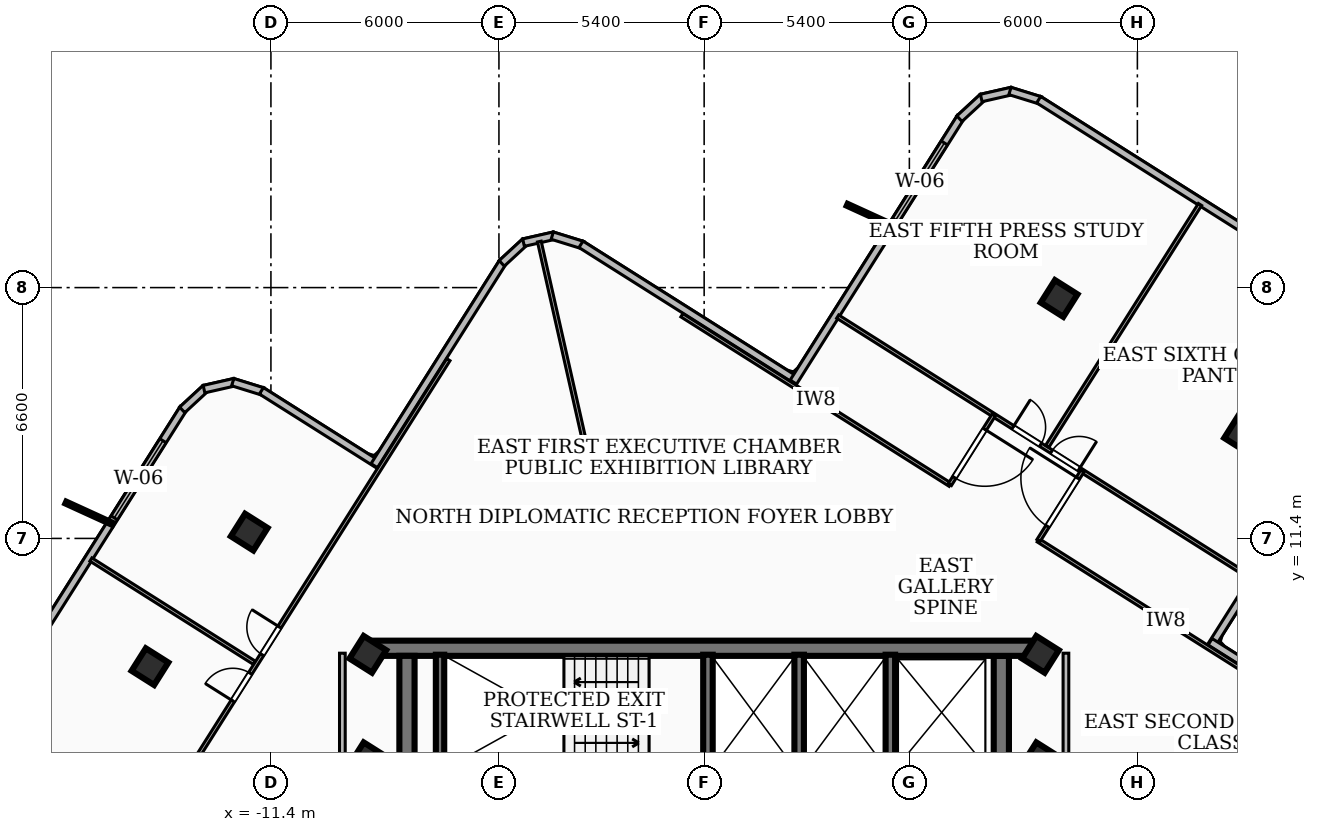
"""IFC4 building model, lengths in metres.
Left out: names, types, materials, properties, quantities, classifications, styles, units other than length and angle.
Written with IfcOpenShell. Run it as: python <this file> out.ifc"""

import sys

from ifc_helpers import new_model, si_unit, direction, frame, frame_2d, origin, origin_2d, place, context, subcontext, project, spatial, rectangle, extrude, element, fill, save


model = new_model("IFC4")
c1 = context("Model", 3, precision=1e-05, world=origin(), true_north=direction((0.0, 1.0)))
c2 = subcontext(c1, "Body", "Model", "MODEL_VIEW")
j1 = project(units=[si_unit("LENGTHUNIT", "METRE"), si_unit("PLANEANGLEUNIT", "RADIAN")], contexts=[c1])
p1 = place(None, origin())
s1 = spatial("IfcSite", under=j1, at=p1, CompositionType="ELEMENT")
p2 = place(p1, origin())
s2 = spatial("IfcBuilding", under=s1, at=p2, CompositionType="ELEMENT")
p3 = place(p2, frame((0.0, 0.0, 271.44)))
s3 = spatial("IfcBuildingStorey", under=s2, at=p3, CompositionType="ELEMENT", Elevation=271.44)
p4 = place(p3, frame((-8.78, 8.51, 0.0), z_axis=(0.0, 0.0, 1.0), x_axis=(1.0, 0.0, 0.0)))
e1 = element("IfcWall", 1, at=p4, inside=s3, PredefinedType="SHEAR", context=c2, shape_type="SweptSolid", body=[
    extrude(rectangle(XDim=17.56, YDim=0.4, at=frame_2d((8.78, 0.0))), origin(), (0.0, 0.0, 1.0), 3.16),
])
for number, where, z_axis, x_axis in (
    (2, (-7.82, 1.95, 0.0), (0.0, 0.0, 1.0), (0.0, 1.0, 0.0)),
    (3, (7.82, 8.31, 0.0), (0.0, 0.0, 1.0), (0.0, -1.0, 0.0)),
):
    element("IfcWall", number, at=place(p3, frame(where, z_axis=z_axis, x_axis=x_axis)), inside=s3, PredefinedType="SHEAR", context=c2, shape_type="SweptSolid", body=[
        extrude(rectangle(XDim=6.36, YDim=0.4, at=frame_2d((3.18, 0.0))), origin(), (0.0, 0.0, 1.0), 3.16),
    ])
p5 = place(p3, frame((-6.95, 5.28, 0.0), z_axis=(0.0, 0.0, 1.0), x_axis=(0.0, 1.0, 0.0)))
e4 = element("IfcWall", 4, at=p5, inside=s3, PredefinedType="SOLIDWALL", context=c2, shape_type="SweptSolid", body=[
    extrude(rectangle(XDim=3.06, YDim=0.22, at=frame_2d((1.53, 0.0))), origin(), (0.0, 0.0, 1.0), 3.16),
])
for number, where, z_axis, x_axis in (
    (5, (0.1, 5.3, 0.0), (0.0, 0.0, 1.0), (0.0, 1.0, 0.0)),
    (6, (2.5, 5.3, 0.0), (0.0, 0.0, 1.0), (0.0, 1.0, 0.0)),
    (7, (4.9, 5.3, 0.0), (0.0, 0.0, 1.0), (0.0, 1.0, 0.0)),
):
    element("IfcWall", number, at=place(p3, frame(where, z_axis=z_axis, x_axis=x_axis)), inside=s3, PredefinedType="SOLIDWALL", context=c2, shape_type="SweptSolid", body=[
        extrude(rectangle(XDim=3.04, YDim=0.25, at=frame_2d((1.52, 0.0))), origin(), (0.0, 0.0, 1.0), 3.16),
    ])
for number, where, z_axis, x_axis in (
    (8, (-8.85, 5.55, 0.0), (0.0, 0.0, 1.0), (0.534, 0.845, 0.0)),
    (9, (8.85, 5.55, 0.0), (0.0, 0.0, 1.0), (0.534, 0.845, 0.0)),
    (10, (-8.85, 8.35, 0.0), (0.0, 0.0, 1.0), (0.534, 0.845, 0.0)),
    (11, (8.85, 8.35, 0.0), (0.0, 0.0, 1.0), (0.534, 0.845, 0.0)),
    (12, (14.169, 14.152, 0.0), (0.0, 0.0, 1.0), (0.534, 0.845, 0.0)),
    (13, (9.341, 17.714, 0.0), (0.0, 0.0, 1.0), (0.534, 0.845, 0.0)),
    (14, (-11.971, 11.566, 0.0), (0.0, 0.0, 1.0), (0.534, 0.845, 0.0)),
    (15, (-14.583, 8.026, 0.0), (0.0, 0.0, 1.0), (0.534, 0.845, 0.0)),
):
    element("IfcColumn", number, at=place(p3, frame(where, z_axis=z_axis, x_axis=x_axis)), inside=s3, PredefinedType="COLUMN", context=c2, shape_type="SweptSolid", body=[
        extrude(rectangle(XDim=0.7, YDim=0.7, at=origin_2d()), origin(), (0.0, 0.0, 1.0), 3.42),
    ])
p6 = place(p3, frame((-19.056, 6.346, 0.0), z_axis=(0.0, 0.0, 1.0), x_axis=(0.534060804588, 0.845446069837, 0.0)))
e16 = element("IfcWall", 16, at=p6, inside=s3, PredefinedType="SOLIDWALL", context=c2, shape_type="SweptSolid", body=[
    extrude(rectangle(XDim=10.023, YDim=0.2, at=frame_2d((5.012, 0.0))), origin(), (0.0, 0.0, 1.0), 3.16),
])
p7 = place(p6, frame((6.618, 0.0, 0.85)))
e17 = element("IfcOpeningElement", 17, at=p7, cuts=e16, PredefinedType="OPENING", context=c2, shape_type="SweptSolid", body=[
    extrude(rectangle(XDim=2.4, YDim=1.85, at=frame_2d((1.2, 0.925))), frame((0.0, 0.11, 0.0), z_axis=(0.0, -1.0, 0.0), x_axis=(1.0, 0.0, 0.0)), (0.0, 0.0, 1.0), 0.22),
])
p8 = place(p3, frame((-13.734, 14.782, 0.0), z_axis=(0.0, 0.0, 1.0), x_axis=(0.73396507435, 0.679187212508, 0.0)))
e18 = element("IfcWall", 18, at=p8, inside=s3, PredefinedType="SOLIDWALL", context=c2, shape_type="SweptSolid", body=[
    extrude(rectangle(XDim=0.838, YDim=0.2, at=frame_2d((0.419, 0.0))), origin(), (0.0, 0.0, 1.0), 3.16),
])
p9 = place(p3, frame((-13.161, 15.328, 0.0), z_axis=(0.0, 0.0, 1.0), x_axis=(0.975030953114, 0.222068999343, 0.0)))
e19 = element("IfcWall", 19, at=p9, inside=s3, PredefinedType="SOLIDWALL", context=c2, shape_type="SweptSolid", body=[
    extrude(rectangle(XDim=0.824, YDim=0.2, at=frame_2d((0.412, 0.0))), origin(), (0.0, 0.0, 1.0), 3.16),
])
p10 = place(p3, frame((-12.405, 15.512, 0.0), z_axis=(0.0, 0.0, 1.0), x_axis=(0.95514660916, -0.296133339917, 0.0)))
e20 = element("IfcWall", 20, at=p10, inside=s3, PredefinedType="SOLIDWALL", context=c2, shape_type="SweptSolid", body=[
    extrude(rectangle(XDim=0.838, YDim=0.2, at=frame_2d((0.419, 0.0))), origin(), (0.0, 0.0, 1.0), 3.16),
])
p11 = place(p3, frame((-11.65, 15.284, 0.0), z_axis=(0.0, 0.0, 1.0), x_axis=(0.84553031048, -0.533927423962, 0.0)))
e21 = element("IfcWall", 21, at=p11, inside=s3, PredefinedType="SOLIDWALL", context=c2, shape_type="SweptSolid", body=[
    extrude(rectangle(XDim=3.643, YDim=0.2, at=frame_2d((1.821, 0.0))), origin(), (0.0, 0.0, 1.0), 3.16),
])
p12 = place(p3, frame((-8.681, 13.314, 0.0), z_axis=(0.0, 0.0, 1.0), x_axis=(0.533927810135, 0.845530066623, 0.0)))
e22 = element("IfcWall", 22, at=p12, inside=s3, PredefinedType="SOLIDWALL", context=c2, shape_type="SweptSolid", body=[
    extrude(rectangle(XDim=6.342, YDim=0.2, at=frame_2d((3.171, 0.0))), origin(), (0.0, 0.0, 1.0), 3.16),
])
p13 = place(p3, frame((-5.326, 18.638, 0.0), z_axis=(0.0, 0.0, 1.0), x_axis=(0.734546260064, 0.678558613405, 0.0)))
e23 = element("IfcWall", 23, at=p13, inside=s3, PredefinedType="SOLIDWALL", context=c2, shape_type="SweptSolid", body=[
    extrude(rectangle(XDim=0.837, YDim=0.2, at=frame_2d((0.418, 0.0))), origin(), (0.0, 0.0, 1.0), 3.16),
])
p14 = place(p3, frame((-4.753, 19.183, 0.0), z_axis=(0.0, 0.0, 1.0), x_axis=(0.975095027757, 0.22178748126, 0.0)))
e24 = element("IfcWall", 24, at=p14, inside=s3, PredefinedType="SOLIDWALL", context=c2, shape_type="SweptSolid", body=[
    extrude(rectangle(XDim=0.824, YDim=0.2, at=frame_2d((0.412, 0.0))), origin(), (0.0, 0.0, 1.0), 3.16),
])
p15 = place(p3, frame((-3.997, 19.367, 0.0), z_axis=(0.0, 0.0, 1.0), x_axis=(0.955248680357, -0.295803919306, 0.0)))
e25 = element("IfcWall", 25, at=p15, inside=s3, PredefinedType="SOLIDWALL", context=c2, shape_type="SweptSolid", body=[
    extrude(rectangle(XDim=0.839, YDim=0.2, at=frame_2d((0.419, 0.0))), origin(), (0.0, 0.0, 1.0), 3.16),
])
p16 = place(p3, frame((-3.241, 19.139, 0.0), z_axis=(0.0, 0.0, 1.0), x_axis=(0.845431246435, -0.534084270085, 0.0)))
e26 = element("IfcWall", 26, at=p16, inside=s3, PredefinedType="SOLIDWALL", context=c2, shape_type="SweptSolid", body=[
    extrude(rectangle(XDim=6.742, YDim=0.2, at=frame_2d((3.371, 0.0))), origin(), (0.0, 0.0, 1.0), 3.16),
])
p17 = place(p3, frame((2.348, 15.513, 0.0), z_axis=(0.0, 0.0, 1.0), x_axis=(0.533962901644, 0.845507906331, 0.0)))
e27 = element("IfcWall", 27, at=p17, inside=s3, PredefinedType="SOLIDWALL", context=c2, shape_type="SweptSolid", body=[
    extrude(rectangle(XDim=8.242, YDim=0.2, at=frame_2d((4.121, 0.0))), origin(), (0.0, 0.0, 1.0), 3.16),
])
p18 = place(p17, frame((5.042, 0.0, 0.85)))
e28 = element("IfcOpeningElement", 28, at=p18, cuts=e27, PredefinedType="OPENING", context=c2, shape_type="SweptSolid", body=[
    extrude(rectangle(XDim=2.4, YDim=1.85, at=frame_2d((1.2, 0.925))), frame((0.0, 0.11, 0.0), z_axis=(0.0, -1.0, 0.0), x_axis=(1.0, 0.0, 0.0)), (0.0, 0.0, 1.0), 0.22),
])
p19 = place(p3, frame((6.718, 22.444, 0.0), z_axis=(0.0, 0.0, 1.0), x_axis=(0.7346916161, 0.67840123027, 0.0)))
e29 = element("IfcWall", 29, at=p19, inside=s3, PredefinedType="SOLIDWALL", context=c2, shape_type="SweptSolid", body=[
    extrude(rectangle(XDim=0.837, YDim=0.2, at=frame_2d((0.418, 0.0))), origin(), (0.0, 0.0, 1.0), 3.16),
])
p20 = place(p3, frame((7.291, 22.989, 0.0), z_axis=(0.0, 0.0, 1.0), x_axis=(0.975030953114, 0.222068999343, 0.0)))
e30 = element("IfcWall", 30, at=p20, inside=s3, PredefinedType="SOLIDWALL", context=c2, shape_type="SweptSolid", body=[
    extrude(rectangle(XDim=0.824, YDim=0.2, at=frame_2d((0.412, 0.0))), origin(), (0.0, 0.0, 1.0), 3.16),
])
p21 = place(p3, frame((8.047, 23.173, 0.0), z_axis=(0.0, 0.0, 1.0), x_axis=(0.955223194498, -0.295886209027, 0.0)))
e31 = element("IfcWall", 31, at=p21, inside=s3, PredefinedType="SOLIDWALL", context=c2, shape_type="SweptSolid", body=[
    extrude(rectangle(XDim=0.838, YDim=0.2, at=frame_2d((0.419, 0.0))), origin(), (0.0, 0.0, 1.0), 3.16),
])
p22 = place(p3, frame((8.803, 22.945, 0.0), z_axis=(0.0, 0.0, 1.0), x_axis=(0.845446069837, -0.534060804588, 0.0)))
e32 = element("IfcWall", 32, at=p22, inside=s3, PredefinedType="SOLIDWALL", context=c2, shape_type="SweptSolid", body=[
    extrude(rectangle(XDim=10.023, YDim=0.2, at=frame_2d((5.012, 0.0))), origin(), (0.0, 0.0, 1.0), 3.16),
])
p23 = place(p22, frame((6.618, 0.0, 0.85)))
e33 = element("IfcOpeningElement", 33, at=p23, cuts=e32, PredefinedType="OPENING", context=c2, shape_type="SweptSolid", body=[
    extrude(rectangle(XDim=2.4, YDim=1.65, at=frame_2d((1.2, 0.825))), frame((0.0, 0.11, 0.0), z_axis=(0.0, -1.0, 0.0), x_axis=(1.0, 0.0, 0.0)), (0.0, 0.0, 1.0), 0.22),
])
p24 = place(p3, frame((17.74, 15.539, 0.0), z_axis=(0.0, 0.0, 1.0), x_axis=(-0.533941726163, -0.845521278893, 0.0)))
e34 = element("IfcWall", 34, at=p24, inside=s3, PredefinedType="SOLIDWALL", context=c2, shape_type="SweptSolid", body=[
    extrude(rectangle(XDim=8.242, YDim=0.2, at=frame_2d((4.121, 0.0))), origin(), (0.0, 0.0, 1.0), 3.16),
])
p25 = place(p24, frame((0.85, 0.0, 0.85)))
e35 = element("IfcOpeningElement", 35, at=p25, cuts=e34, PredefinedType="OPENING", context=c2, shape_type="SweptSolid", body=[
    extrude(rectangle(XDim=1.5, YDim=1.5, at=frame_2d((0.75, 0.75))), frame((0.0, 0.11, 0.0), z_axis=(0.0, -1.0, 0.0), x_axis=(1.0, 0.0, 0.0)), (0.0, 0.0, 1.0), 0.22),
])
p26 = place(p3, frame((13.314, 8.681, 0.0), z_axis=(0.0, 0.0, 1.0), x_axis=(0.845530066623, -0.533927810135, 0.0)))
e36 = element("IfcWall", 36, at=p26, inside=s3, PredefinedType="SOLIDWALL", context=c2, shape_type="SweptSolid", body=[
    extrude(rectangle(XDim=6.342, YDim=0.2, at=frame_2d((3.171, 0.0))), origin(), (0.0, 0.0, 1.0), 3.16),
])
p27 = place(p3, frame((-9.52, 1.75, 0.0), z_axis=(0.0, 0.0, 1.0), x_axis=(0.0, 1.0, 0.0)))
e37 = element("IfcWall", 37, at=p27, inside=s3, PredefinedType="PARTITIONING", context=c2, shape_type="SweptSolid", body=[
    extrude(rectangle(XDim=6.63, YDim=0.15, at=frame_2d((3.315, 0.0))), origin(), (0.0, 0.0, 1.0), 2.53),
])
p28 = place(p3, frame((9.52, 1.75, 0.0), z_axis=(0.0, 0.0, 1.0), x_axis=(0.0, 1.0, 0.0)))
e38 = element("IfcWall", 38, at=p28, inside=s3, PredefinedType="PARTITIONING", context=c2, shape_type="SweptSolid", body=[
    extrude(rectangle(XDim=6.63, YDim=0.15, at=frame_2d((3.315, 0.0))), origin(), (0.0, 0.0, 1.0), 3.16),
])
p29 = place(p3, frame((-3.056, 13.54, 0.0), z_axis=(0.0, 0.0, 1.0), x_axis=(-0.22033949405, 0.975423245244, 0.0)))
e39 = element("IfcWall", 39, at=p29, inside=s3, PredefinedType="PARTITIONING", context=c2, shape_type="SweptSolid", body=[
    extrude(rectangle(XDim=5.814, YDim=0.1, at=frame_2d((2.907, 0.0))), origin(), (0.0, 0.0, 1.0), 3.16),
])
p30 = place(p3, frame((6.473, 12.813, 0.0), z_axis=(0.0, 0.0, 1.0), x_axis=(-0.845447210208, 0.534058999317, 0.0)))
e40 = element("IfcWall", 40, at=p30, inside=s3, PredefinedType="PARTITIONING", context=c2, shape_type="SweptSolid", body=[
    extrude(rectangle(XDim=8.349, YDim=0.1, at=frame_2d((4.175, 0.0))), origin(), (0.0, 0.0, 1.0), 3.16),
])
p31 = place(p3, frame((15.512, 7.104, 0.0), z_axis=(0.0, 0.0, 1.0), x_axis=(-0.845450958208, 0.534053065963, 0.0)))
e41 = element("IfcWall", 41, at=p31, inside=s3, PredefinedType="PARTITIONING", context=c2, shape_type="SweptSolid", body=[
    extrude(rectangle(XDim=7.951, YDim=0.1, at=frame_2d((3.975, 0.0))), origin(), (0.0, 0.0, 1.0), 2.53),
])
p32 = place(p3, frame((7.619, 14.645, 0.0), z_axis=(0.0, 0.0, 1.0), x_axis=(-0.533984489243, -0.845494272747, 0.0)))
e42 = element("IfcWall", 42, at=p32, inside=s3, PredefinedType="PARTITIONING", context=c2, shape_type="SweptSolid", body=[
    extrude(rectangle(XDim=2.161, YDim=0.1, at=frame_2d((1.08, 0.0))), origin(), (0.0, 0.0, 1.0), 3.16),
])
p33 = place(p32, frame((0.441, 0.0, 0.0)))
e43 = element("IfcOpeningElement", 43, at=p33, cuts=e42, PredefinedType="OPENING", context=c2, shape_type="SweptSolid", body=[
    extrude(rectangle(XDim=1.5, YDim=2.12, at=frame_2d((0.75, 1.06))), frame((0.0, 0.06, 0.0), z_axis=(0.0, -1.0, 0.0), x_axis=(1.0, 0.0, 0.0)), (0.0, 0.0, 1.0), 0.12),
])
p34 = place(p3, frame((8.798, 11.344, 0.0), z_axis=(0.0, 0.0, 1.0), x_axis=(0.533984489243, 0.845494272747, 0.0)))
e44 = element("IfcWall", 44, at=p34, inside=s3, PredefinedType="PARTITIONING", context=c2, shape_type="SweptSolid", body=[
    extrude(rectangle(XDim=2.161, YDim=0.1, at=frame_2d((1.08, 0.0))), origin(), (0.0, 0.0, 1.0), 2.53),
])
p35 = place(p34, frame((0.441, 0.0, 0.0)))
e45 = element("IfcOpeningElement", 45, at=p35, cuts=e44, PredefinedType="OPENING", context=c2, shape_type="SweptSolid", body=[
    extrude(rectangle(XDim=1.5, YDim=2.12, at=frame_2d((0.75, 1.06))), frame((0.0, 0.06, 0.0), z_axis=(0.0, -1.0, 0.0), x_axis=(1.0, 0.0, 0.0)), (0.0, 0.0, 1.0), 0.12),
])
p36 = place(p3, frame((9.029, 13.825, 0.0), z_axis=(0.0, 0.0, 1.0), x_axis=(0.534078432884, 0.845434933941, 0.0)))
e46 = element("IfcWall", 46, at=p36, inside=s3, PredefinedType="PARTITIONING", context=c2, shape_type="SweptSolid", body=[
    extrude(rectangle(XDim=7.525, YDim=0.1, at=frame_2d((3.763, 0.0))), origin(), (0.0, 0.0, 1.0), 2.53),
])
p37 = place(p3, frame((3.514, 17.237, 0.0), z_axis=(0.0, 0.0, 1.0), x_axis=(0.845461855996, -0.534035813458, 0.0)))
e47 = element("IfcWall", 47, at=p37, inside=s3, PredefinedType="PARTITIONING", context=c2, shape_type="SweptSolid", body=[
    extrude(rectangle(XDim=12.87, YDim=0.1, at=frame_2d((6.435, 0.0))), origin(), (0.0, 0.0, 1.0), 2.53),
])
p38 = place(p37, frame((6.655, 0.0, 0.0)))
e48 = element("IfcOpeningElement", 48, at=p38, cuts=e47, PredefinedType="OPENING", context=c2, shape_type="SweptSolid", body=[
    extrude(rectangle(XDim=0.86, YDim=2.04, at=frame_2d((0.43, 1.02))), frame((0.0, 0.06, 0.0), z_axis=(0.0, -1.0, 0.0), x_axis=(1.0, 0.0, 0.0)), (0.0, 0.0, 1.0), 0.12),
])
p39 = place(p37, frame((5.454, 0.0, 0.0)))
e49 = element("IfcOpeningElement", 49, at=p39, cuts=e47, PredefinedType="OPENING", context=c2, shape_type="SweptSolid", body=[
    extrude(rectangle(XDim=0.86, YDim=2.04, at=frame_2d((0.43, 1.02))), frame((0.0, 0.06, 0.0), z_axis=(0.0, -1.0, 0.0), x_axis=(1.0, 0.0, 0.0)), (0.0, 0.0, 1.0), 0.12),
])
p40 = place(p3, frame((-11.838, 8.129, 0.0), z_axis=(0.0, 0.0, 1.0), x_axis=(-0.845412458252, 0.53411400977, 0.0)))
e50 = element("IfcWall", 50, at=p40, inside=s3, PredefinedType="PARTITIONING", context=c2, shape_type="SweptSolid", body=[
    extrude(rectangle(XDim=5.085, YDim=0.1, at=frame_2d((2.542, 0.0))), origin(), (0.0, 0.0, 1.0), 2.53),
])
p41 = place(p3, frame((-17.646, -1.178, 0.0), z_axis=(0.0, 0.0, 1.0), x_axis=(0.534052309352, 0.845451436143, 0.0)))
e51 = element("IfcWall", 51, at=p41, inside=s3, PredefinedType="PARTITIONING", context=c2, shape_type="SweptSolid", body=[
    extrude(rectangle(XDim=20.44, YDim=0.1, at=frame_2d((10.22, 0.0))), origin(), (0.0, 0.0, 1.0), 2.53),
])
p42 = place(p41, frame((11.259, 0.0, 0.0)))
e52 = element("IfcOpeningElement", 52, at=p42, cuts=e51, PredefinedType="OPENING", context=c2, shape_type="SweptSolid", body=[
    extrude(rectangle(XDim=0.86, YDim=2.04, at=frame_2d((0.43, 1.02))), frame((0.0, 0.06, 0.0), z_axis=(0.0, -1.0, 0.0), x_axis=(1.0, 0.0, 0.0)), (0.0, 0.0, 1.0), 0.12),
])
p43 = place(p41, frame((9.819, 0.0, 0.0)))
e53 = element("IfcOpeningElement", 53, at=p43, cuts=e51, PredefinedType="OPENING", context=c2, shape_type="SweptSolid", body=[
    extrude(rectangle(XDim=0.86, YDim=2.04, at=frame_2d((0.43, 1.02))), frame((0.0, 0.06, 0.0), z_axis=(0.0, -1.0, 0.0), x_axis=(1.0, 0.0, 0.0)), (0.0, 0.0, 1.0), 0.12),
])
p44 = place(p7, origin())
e54 = element("IfcWindow", 54, at=p44, inside=s3, PartitioningType="SINGLE_PANEL", PredefinedType="WINDOW", context=c2, shape_type="SweptSolid", body=[
    extrude(rectangle(XDim=2.4, YDim=1.85, at=frame_2d((1.2, 0.925))), frame((0.0, 0.03, 0.0), z_axis=(0.0, -1.0, 0.0), x_axis=(1.0, 0.0, 0.0)), (0.0, 0.0, 1.0), 0.06),
])
fill(e17, e54)
p45 = place(p18, origin())
e55 = element("IfcWindow", 55, at=p45, inside=s3, PartitioningType="SINGLE_PANEL", PredefinedType="WINDOW", context=c2, shape_type="SweptSolid", body=[
    extrude(rectangle(XDim=2.4, YDim=1.85, at=frame_2d((1.2, 0.925))), frame((0.0, 0.03, 0.0), z_axis=(0.0, -1.0, 0.0), x_axis=(1.0, 0.0, 0.0)), (0.0, 0.0, 1.0), 0.06),
])
fill(e28, e55)
p46 = place(p33, origin())
e56 = element("IfcDoor", 56, at=p46, inside=s3, OperationType="SINGLE_SWING_LEFT", PredefinedType="DOOR", context=c2, shape_type="SweptSolid", body=[
    extrude(rectangle(XDim=1.5, YDim=2.12, at=frame_2d((0.75, 1.06))), frame((0.0, 0.025, 0.0), z_axis=(0.0, -1.0, 0.0), x_axis=(1.0, 0.0, 0.0)), (0.0, 0.0, 1.0), 0.05),
])
fill(e43, e56)
p47 = place(p35, origin())
e57 = element("IfcDoor", 57, at=p47, inside=s3, OperationType="SINGLE_SWING_RIGHT", PredefinedType="DOOR", context=c2, shape_type="SweptSolid", body=[
    extrude(rectangle(XDim=1.5, YDim=2.12, at=frame_2d((0.75, 1.06))), frame((0.0, 0.025, 0.0), z_axis=(0.0, -1.0, 0.0), x_axis=(1.0, 0.0, 0.0)), (0.0, 0.0, 1.0), 0.05),
])
fill(e45, e57)
p48 = place(p38, origin())
e58 = element("IfcDoor", 58, at=p48, inside=s3, OperationType="SINGLE_SWING_RIGHT", PredefinedType="DOOR", context=c2, shape_type="SweptSolid", body=[
    extrude(rectangle(XDim=0.86, YDim=2.04, at=frame_2d((0.43, 1.02))), frame((0.0, 0.025, 0.0), z_axis=(0.0, -1.0, 0.0), x_axis=(1.0, 0.0, 0.0)), (0.0, 0.0, 1.0), 0.05),
])
fill(e48, e58)
p49 = place(p39, origin())
e59 = element("IfcDoor", 59, at=p49, inside=s3, OperationType="SINGLE_SWING_LEFT", PredefinedType="DOOR", context=c2, shape_type="SweptSolid", body=[
    extrude(rectangle(XDim=0.86, YDim=2.04, at=frame_2d((0.43, 1.02))), frame((0.0, 0.025, 0.0), z_axis=(0.0, -1.0, 0.0), x_axis=(1.0, 0.0, 0.0)), (0.0, 0.0, 1.0), 0.05),
])
fill(e49, e59)
p50 = place(p42, origin())
e60 = element("IfcDoor", 60, at=p50, inside=s3, OperationType="SINGLE_SWING_RIGHT", PredefinedType="DOOR", context=c2, shape_type="SweptSolid", body=[
    extrude(rectangle(XDim=0.86, YDim=2.04, at=frame_2d((0.43, 1.02))), frame((0.0, 0.025, 0.0), z_axis=(0.0, -1.0, 0.0), x_axis=(1.0, 0.0, 0.0)), (0.0, 0.0, 1.0), 0.05),
])
fill(e52, e60)
p51 = place(p43, origin())
e61 = element("IfcDoor", 61, at=p51, inside=s3, OperationType="SINGLE_SWING_LEFT", PredefinedType="DOOR", context=c2, shape_type="SweptSolid", body=[
    extrude(rectangle(XDim=0.86, YDim=2.04, at=frame_2d((0.43, 1.02))), frame((0.0, 0.025, 0.0), z_axis=(0.0, -1.0, 0.0), x_axis=(1.0, 0.0, 0.0)), (0.0, 0.0, 1.0), 0.05),
])
fill(e53, e61)
save(model, sys.argv[1])
